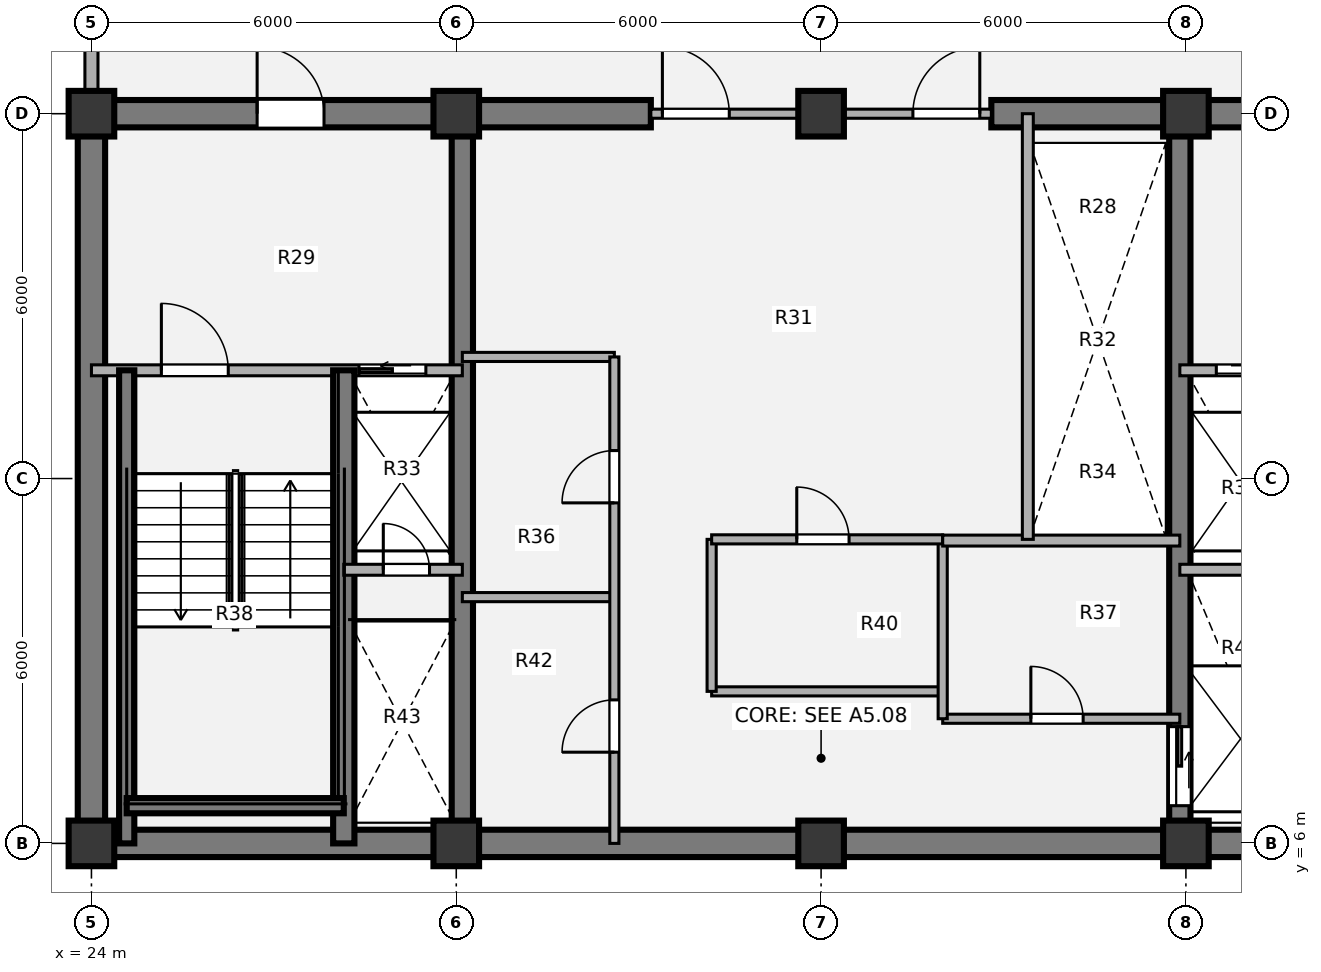
"""IFC4 building model, lengths in metres.
Left out: names, types, materials, properties, quantities, classifications, styles, units other than length and angle.
Written with IfcOpenShell. Run it as: python <this file> out.ifc"""

import sys

from ifc_helpers import new_model, si_unit, direction, frame, frame_2d, origin, origin_2d, place, context, subcontext, project, spatial, rectangle, extrude, source, transform, mapped, element, fill, save


model = new_model("IFC4")
c1 = context("Model", 3, precision=1e-05, world=origin(), true_north=direction((0.0, 1.0)))
c2 = subcontext(c1, "Body", "Model", "MODEL_VIEW")
j1 = project(units=[si_unit("LENGTHUNIT", "METRE"), si_unit("PLANEANGLEUNIT", "RADIAN")], contexts=[c1])
p1 = place(None, origin())
s1 = spatial("IfcSite", under=j1, at=p1, CompositionType="ELEMENT")
p2 = place(p1, origin())
s2 = spatial("IfcBuilding", under=s1, at=p2, CompositionType="ELEMENT")
p3 = place(p2, frame((0.0, 0.0, 209.34)))
s3 = spatial("IfcBuildingStorey", under=s2, at=p3, CompositionType="ELEMENT", Elevation=209.34)
m1 = source(origin(), c2, "Body", "SweptSolid", [
    extrude(rectangle(XDim=0.75, YDim=0.75, at=origin_2d()), origin(), (0.0, 0.0, 1.0), 3.78),
])
for number, where, z_axis, x_axis in (
    (1, (24.0, 6.0, 0.0), (0.0, 0.0, 1.0), (1.0, 0.0, 0.0)),
    (2, (30.0, 6.0, 0.0), (0.0, 0.0, 1.0), (1.0, 0.0, 0.0)),
    (3, (36.0, 6.0, 0.0), (0.0, 0.0, 1.0), (1.0, 0.0, 0.0)),
    (4, (42.0, 6.0, 0.0), (0.0, 0.0, 1.0), (1.0, 0.0, 0.0)),
    (5, (24.0, 18.0, 0.0), (0.0, 0.0, 1.0), (1.0, 0.0, 0.0)),
    (6, (30.0, 18.0, 0.0), (0.0, 0.0, 1.0), (1.0, 0.0, 0.0)),
    (7, (36.0, 18.0, 0.0), (0.0, 0.0, 1.0), (1.0, 0.0, 0.0)),
    (8, (42.0, 18.0, 0.0), (0.0, 0.0, 1.0), (1.0, 0.0, 0.0)),
):
    element("IfcColumn", number, at=place(p3, frame(where, z_axis=z_axis, x_axis=x_axis)), inside=s3, PredefinedType="COLUMN", context=c2, shape_type="MappedRepresentation", body=[
        mapped(m1, transform((0.0, 0.0, 0.0), x_axis=(1.0, 0.0, 0.0), y_axis=(0.0, 1.0, 0.0), z_axis=(0.0, 0.0, 1.0), scale=1.0)),
    ])
p4 = place(p3, frame((48.225, 6.0, 0.0), z_axis=(0.0, 0.0, 1.0), x_axis=(-1.0, 0.0, 0.0)))
e9 = element("IfcWall", 9, at=p4, inside=s3, PredefinedType="SHEAR", context=c2, shape_type="SweptSolid", body=[
    extrude(rectangle(XDim=24.45, YDim=0.45, at=frame_2d((12.225, 0.0))), origin(), (0.0, 0.0, 1.0), 3.78),
])
p5 = place(p3, frame((24.0, 6.0, 0.0), z_axis=(0.0, 0.0, 1.0), x_axis=(0.0, 1.0, 0.0)))
e10 = element("IfcWall", 10, at=p5, inside=s3, PredefinedType="SHEAR", context=c2, shape_type="SweptSolid", body=[
    extrude(rectangle(XDim=12.0, YDim=0.45, at=frame_2d((6.0, 0.0))), origin(), (0.0, 0.0, 1.0), 3.78),
])
p6 = place(p3, frame((23.775, 18.0, 0.0), z_axis=(0.0, 0.0, 1.0), x_axis=(1.0, 0.0, 0.0)))
e11 = element("IfcWall", 11, at=p6, inside=s3, PredefinedType="SHEAR", context=c2, shape_type="SweptSolid", body=[
    extrude(rectangle(XDim=9.425, YDim=0.45, at=frame_2d((4.712, 0.0))), origin(), (0.0, 0.0, 1.0), 3.78),
])
p7 = place(p6, frame((2.95, 0.0, 0.0)))
e12 = element("IfcOpeningElement", 12, at=p7, cuts=e11, PredefinedType="OPENING", context=c2, shape_type="SweptSolid", body=[
    extrude(rectangle(XDim=1.1, YDim=2.1, at=origin_2d()), frame((0.55, 0.235, 1.05), z_axis=(0.0, -1.0, 0.0), x_axis=(1.0, 0.0, 0.0)), (0.0, 0.0, 1.0), 0.47),
])
p8 = place(p3, frame((38.8, 18.0, 0.0), z_axis=(0.0, 0.0, 1.0), x_axis=(1.0, 0.0, 0.0)))
e13 = element("IfcWall", 13, at=p8, inside=s3, PredefinedType="SHEAR", context=c2, shape_type="SweptSolid", body=[
    extrude(rectangle(XDim=9.425, YDim=0.45, at=frame_2d((4.712, 0.0))), origin(), (0.0, 0.0, 1.0), 3.78),
])
p9 = place(p8, frame((5.45, 0.0, 0.0)))
e14 = element("IfcOpeningElement", 14, at=p9, cuts=e13, PredefinedType="OPENING", context=c2, shape_type="SweptSolid", body=[
    extrude(rectangle(XDim=1.1, YDim=2.1, at=origin_2d()), frame((0.55, 0.235, 1.05), z_axis=(0.0, -1.0, 0.0), x_axis=(1.0, 0.0, 0.0)), (0.0, 0.0, 1.0), 0.47),
])
p10 = place(p3, frame((30.1, 6.0, 0.0), z_axis=(0.0, 0.0, 1.0), x_axis=(0.0, 1.0, 0.0)))
e15 = element("IfcWall", 15, at=p10, inside=s3, PredefinedType="SHEAR", context=c2, shape_type="SweptSolid", body=[
    extrude(rectangle(XDim=12.0, YDim=0.35, at=frame_2d((6.0, 0.0))), origin(), (0.0, 0.0, 1.0), 3.78),
])
p11 = place(p3, frame((41.9, 18.0, 0.0), z_axis=(0.0, 0.0, 1.0), x_axis=(0.0, -1.0, 0.0)))
e16 = element("IfcWall", 16, at=p11, inside=s3, PredefinedType="SHEAR", context=c2, shape_type="SweptSolid", body=[
    extrude(rectangle(XDim=12.0, YDim=0.35, at=frame_2d((6.0, 0.0))), origin(), (0.0, 0.0, 1.0), 3.78),
])
p12 = place(p11, frame((10.08, 0.0, 0.0)))
e17 = element("IfcOpeningElement", 17, at=p12, cuts=e16, PredefinedType="OPENING", context=c2, shape_type="SweptSolid", body=[
    extrude(rectangle(XDim=1.3, YDim=2.1, at=origin_2d()), frame((0.65, 0.185, 1.05), z_axis=(0.0, -1.0, 0.0), x_axis=(1.0, 0.0, 0.0)), (0.0, 0.0, 1.0), 0.37),
])
p13 = place(p3, frame((24.0, 18.355, 0.0), z_axis=(0.0, 0.0, 1.0), x_axis=(0.0, 1.0, 0.0)))
e18 = element("IfcWall", 18, at=p13, inside=s3, PredefinedType="SOLIDWALL", context=c2, shape_type="SweptSolid", body=[
    extrude(rectangle(XDim=2.695, YDim=0.215, at=frame_2d((1.348, 0.0))), origin(), (0.0, 0.0, 1.0), 1.86),
])
p14 = place(p3, frame((30.1, 14.0, 0.0), z_axis=(0.0, 0.0, 1.0), x_axis=(1.0, 0.0, 0.0)))
e19 = element("IfcWall", 19, at=p14, inside=s3, PredefinedType="PARTITIONING", context=c2, shape_type="SweptSolid", body=[
    extrude(rectangle(XDim=2.5, YDim=0.15, at=frame_2d((1.25, 0.0))), origin(), (0.0, 0.0, 1.0), 3.342),
])
p15 = place(p3, frame((34.2, 8.5, 0.0), z_axis=(0.0, 0.0, 1.0), x_axis=(1.0, 0.0, 0.0)))
e20 = element("IfcWall", 20, at=p15, inside=s3, PredefinedType="PARTITIONING", context=c2, shape_type="SweptSolid", body=[
    extrude(rectangle(XDim=3.8, YDim=0.15, at=frame_2d((1.9, 0.0))), origin(), (0.0, 0.0, 1.0), 3.342),
])
p16 = place(p3, frame((38.0, 8.05, 0.0), z_axis=(0.0, 0.0, 1.0), x_axis=(1.0, 0.0, 0.0)))
e21 = element("IfcWall", 21, at=p16, inside=s3, PredefinedType="PARTITIONING", context=c2, shape_type="SweptSolid", body=[
    extrude(rectangle(XDim=3.9, YDim=0.15, at=frame_2d((1.95, 0.0))), origin(), (0.0, 0.0, 1.0), 3.342),
])
p17 = place(p16, frame((1.45, 0.0, 0.0)))
e22 = element("IfcOpeningElement", 22, at=p17, cuts=e21, PredefinedType="OPENING", context=c2, shape_type="SweptSolid", body=[
    extrude(rectangle(XDim=0.86, YDim=2.1, at=origin_2d()), frame((0.43, 0.085, 1.05), z_axis=(0.0, -1.0, 0.0), x_axis=(1.0, 0.0, 0.0)), (0.0, 0.0, 1.0), 0.17),
])
p18 = place(p3, frame((34.2, 8.5, 0.0), z_axis=(0.0, 0.0, 1.0), x_axis=(0.0, 1.0, 0.0)))
e23 = element("IfcWall", 23, at=p18, inside=s3, PredefinedType="PARTITIONING", context=c2, shape_type="SweptSolid", body=[
    extrude(rectangle(XDim=2.5, YDim=0.15, at=frame_2d((1.25, 0.0))), origin(), (0.0, 0.0, 1.0), 3.342),
])
p19 = place(p3, frame((38.0, 8.05, 0.0), z_axis=(0.0, 0.0, 1.0), x_axis=(0.0, 1.0, 0.0)))
e24 = element("IfcWall", 24, at=p19, inside=s3, PredefinedType="PARTITIONING", context=c2, shape_type="SweptSolid", body=[
    extrude(rectangle(XDim=2.95, YDim=0.15, at=frame_2d((1.475, 0.0))), origin(), (0.0, 0.0, 1.0), 3.342),
])
p20 = place(p3, frame((34.2, 11.0, 0.0), z_axis=(0.0, 0.0, 1.0), x_axis=(1.0, 0.0, 0.0)))
e25 = element("IfcWall", 25, at=p20, inside=s3, PredefinedType="PARTITIONING", context=c2, shape_type="SweptSolid", body=[
    extrude(rectangle(XDim=3.8, YDim=0.15, at=frame_2d((1.9, 0.0))), origin(), (0.0, 0.0, 1.0), 3.342),
])
p21 = place(p20, frame((1.4, 0.0, 0.0)))
e26 = element("IfcOpeningElement", 26, at=p21, cuts=e25, PredefinedType="OPENING", context=c2, shape_type="SweptSolid", body=[
    extrude(rectangle(XDim=0.86, YDim=2.1, at=origin_2d()), frame((0.43, 0.085, 1.05), z_axis=(0.0, -1.0, 0.0), x_axis=(1.0, 0.0, 0.0)), (0.0, 0.0, 1.0), 0.17),
])
p22 = place(p3, frame((38.0, 10.98, 0.0), z_axis=(0.0, 0.0, 1.0), x_axis=(1.0, 0.0, 0.0)))
e27 = element("IfcWall", 27, at=p22, inside=s3, PredefinedType="PARTITIONING", context=c2, shape_type="SweptSolid", body=[
    extrude(rectangle(XDim=3.9, YDim=0.18, at=frame_2d((1.95, 0.0))), origin(), (0.0, 0.0, 1.0), 3.342),
])
p23 = place(p3, frame((39.4, 11.0, 0.0), z_axis=(0.0, 0.0, 1.0), x_axis=(0.0, 1.0, 0.0)))
e28 = element("IfcWall", 28, at=p23, inside=s3, PredefinedType="PARTITIONING", context=c2, shape_type="SweptSolid", body=[
    extrude(rectangle(XDim=7.0, YDim=0.18, at=frame_2d((3.5, 0.0))), origin(), (0.0, 0.0, 1.0), 3.342),
])
p24 = place(p3, frame((30.1, 10.05, 0.0), z_axis=(0.0, 0.0, 1.0), x_axis=(1.0, 0.0, 0.0)))
e29 = element("IfcWall", 29, at=p24, inside=s3, PredefinedType="PARTITIONING", context=c2, shape_type="SweptSolid", body=[
    extrude(rectangle(XDim=2.5, YDim=0.15, at=frame_2d((1.25, 0.0))), origin(), (0.0, 0.0, 1.0), 3.342),
])
p25 = place(p3, frame((32.6, 6.0, 0.0), z_axis=(0.0, 0.0, 1.0), x_axis=(0.0, 1.0, 0.0)))
e30 = element("IfcWall", 30, at=p25, inside=s3, PredefinedType="PARTITIONING", context=c2, shape_type="SweptSolid", body=[
    extrude(rectangle(XDim=8.0, YDim=0.15, at=frame_2d((4.0, 0.0))), origin(), (0.0, 0.0, 1.0), 3.342),
])
p26 = place(p25, frame((1.5, 0.0, 0.0)))
e31 = element("IfcOpeningElement", 31, at=p26, cuts=e30, PredefinedType="OPENING", context=c2, shape_type="SweptSolid", body=[
    extrude(rectangle(XDim=0.86, YDim=2.1, at=origin_2d()), frame((0.43, 0.085, 1.05), z_axis=(0.0, -1.0, 0.0), x_axis=(1.0, 0.0, 0.0)), (0.0, 0.0, 1.0), 0.17),
])
p27 = place(p25, frame((5.6, 0.0, 0.0)))
e32 = element("IfcOpeningElement", 32, at=p27, cuts=e30, PredefinedType="OPENING", context=c2, shape_type="SweptSolid", body=[
    extrude(rectangle(XDim=0.86, YDim=2.1, at=origin_2d()), frame((0.43, 0.085, 1.05), z_axis=(0.0, -1.0, 0.0), x_axis=(1.0, 0.0, 0.0)), (0.0, 0.0, 1.0), 0.17),
])
p28 = place(p3, frame((33.2, 18.0, 0.0), z_axis=(0.0, 0.0, 1.0), x_axis=(1.0, 0.0, 0.0)))
e33 = element("IfcWall", 33, at=p28, inside=s3, PredefinedType="PARTITIONING", context=c2, shape_type="SweptSolid", body=[
    extrude(rectangle(XDim=5.6, YDim=0.15, at=frame_2d((2.8, 0.0))), origin(), (0.0, 0.0, 1.0), 2.357),
])
p29 = place(p28, frame((0.19, 0.0, 0.0)))
e34 = element("IfcOpeningElement", 34, at=p29, cuts=e33, PredefinedType="OPENING", context=c2, shape_type="SweptSolid", body=[
    extrude(rectangle(XDim=1.1, YDim=2.1, at=origin_2d()), frame((0.55, 0.085, 1.05), z_axis=(0.0, -1.0, 0.0), x_axis=(1.0, 0.0, 0.0)), (0.0, 0.0, 1.0), 0.17),
])
p30 = place(p28, frame((4.31, 0.0, 0.0)))
e35 = element("IfcOpeningElement", 35, at=p30, cuts=e33, PredefinedType="OPENING", context=c2, shape_type="SweptSolid", body=[
    extrude(rectangle(XDim=1.1, YDim=2.1, at=origin_2d()), frame((0.55, 0.085, 1.05), z_axis=(0.0, -1.0, 0.0), x_axis=(1.0, 0.0, 0.0)), (0.0, 0.0, 1.0), 0.17),
])
p31 = place(p3, frame((24.0, 13.78, 0.0), z_axis=(0.0, 0.0, 1.0), x_axis=(1.0, 0.0, 0.0)))
e36 = element("IfcWall", 36, at=p31, inside=s3, PredefinedType="PARTITIONING", context=c2, shape_type="SweptSolid", body=[
    extrude(rectangle(XDim=6.1, YDim=0.18, at=frame_2d((3.05, 0.0))), origin(), (0.0, 0.0, 1.0), 3.342),
])
p32 = place(p31, frame((1.15, 0.0, 0.0)))
e37 = element("IfcOpeningElement", 37, at=p32, cuts=e36, PredefinedType="OPENING", context=c2, shape_type="SweptSolid", body=[
    extrude(rectangle(XDim=1.1, YDim=2.1, at=origin_2d()), frame((0.55, 0.1, 1.05), z_axis=(0.0, -1.0, 0.0), x_axis=(1.0, 0.0, 0.0)), (0.0, 0.0, 1.0), 0.2),
])
p33 = place(p31, frame((4.4, 0.0, 0.0)))
e38 = element("IfcOpeningElement", 38, at=p33, cuts=e36, PredefinedType="OPENING", context=c2, shape_type="SweptSolid", body=[
    extrude(rectangle(XDim=1.1, YDim=2.1, at=origin_2d()), frame((0.55, 0.1, 1.05), z_axis=(0.0, -1.0, 0.0), x_axis=(1.0, 0.0, 0.0)), (0.0, 0.0, 1.0), 0.2),
])
p34 = place(p3, frame((28.15, 6.0, 0.0), z_axis=(0.0, 0.0, 1.0), x_axis=(0.0, 1.0, 0.0)))
e39 = element("IfcWall", 39, at=p34, inside=s3, PredefinedType="SHEAR", context=c2, shape_type="SweptSolid", body=[
    extrude(rectangle(XDim=7.78, YDim=0.35, at=frame_2d((3.89, 0.0))), origin(), (0.0, 0.0, 1.0), 3.692),
])
p35 = place(p3, frame((24.58, 6.0, 0.0), z_axis=(0.0, 0.0, 1.0), x_axis=(0.0, 1.0, 0.0)))
e40 = element("IfcWall", 40, at=p35, inside=s3, PredefinedType="SHEAR", context=c2, shape_type="SweptSolid", body=[
    extrude(rectangle(XDim=7.78, YDim=0.25, at=frame_2d((3.89, 0.0))), origin(), (0.0, 0.0, 1.0), 3.692),
])
p36 = place(p3, frame((24.58, 6.62, 0.0), z_axis=(0.0, 0.0, 1.0), x_axis=(1.0, 0.0, 0.0)))
e41 = element("IfcWall", 41, at=p36, inside=s3, PredefinedType="SHEAR", context=c2, shape_type="SweptSolid", body=[
    extrude(rectangle(XDim=3.57, YDim=0.25, at=frame_2d((1.785, 0.0))), origin(), (0.0, 0.0, 1.0), 3.692),
])
p37 = place(p3, frame((28.15, 10.5, 0.0), z_axis=(0.0, 0.0, 1.0), x_axis=(1.0, 0.0, 0.0)))
e42 = element("IfcWall", 42, at=p37, inside=s3, PredefinedType="PARTITIONING", context=c2, shape_type="SweptSolid", body=[
    extrude(rectangle(XDim=1.95, YDim=0.18, at=frame_2d((0.975, 0.0))), origin(), (0.0, 0.0, 1.0), 3.342),
])
p38 = place(p37, frame((0.65, 0.0, 0.0)))
e43 = element("IfcOpeningElement", 43, at=p38, cuts=e42, PredefinedType="OPENING", context=c2, shape_type="SweptSolid", body=[
    extrude(rectangle(XDim=0.76, YDim=2.05, at=origin_2d()), frame((0.38, 0.1, 1.025), z_axis=(0.0, -1.0, 0.0), x_axis=(1.0, 0.0, 0.0)), (0.0, 0.0, 1.0), 0.2),
])
p39 = place(p3, frame((41.9, 13.78, 0.0), z_axis=(0.0, 0.0, 1.0), x_axis=(1.0, 0.0, 0.0)))
e44 = element("IfcWall", 44, at=p39, inside=s3, PredefinedType="PARTITIONING", context=c2, shape_type="SweptSolid", body=[
    extrude(rectangle(XDim=6.1, YDim=0.18, at=frame_2d((3.05, 0.0))), origin(), (0.0, 0.0, 1.0), 3.342),
])
p40 = place(p39, frame((0.6, 0.0, 0.0)))
e45 = element("IfcOpeningElement", 45, at=p40, cuts=e44, PredefinedType="OPENING", context=c2, shape_type="SweptSolid", body=[
    extrude(rectangle(XDim=1.1, YDim=2.1, at=origin_2d()), frame((0.55, 0.1, 1.05), z_axis=(0.0, -1.0, 0.0), x_axis=(1.0, 0.0, 0.0)), (0.0, 0.0, 1.0), 0.2),
])
p41 = place(p39, frame((3.8, 0.0, 0.0)))
e46 = element("IfcOpeningElement", 46, at=p41, cuts=e44, PredefinedType="OPENING", context=c2, shape_type="SweptSolid", body=[
    extrude(rectangle(XDim=1.1, YDim=2.1, at=origin_2d()), frame((0.55, 0.1, 1.05), z_axis=(0.0, -1.0, 0.0), x_axis=(1.0, 0.0, 0.0)), (0.0, 0.0, 1.0), 0.2),
])
p42 = place(p3, frame((41.9, 10.5, 0.0), z_axis=(0.0, 0.0, 1.0), x_axis=(1.0, 0.0, 0.0)))
e47 = element("IfcWall", 47, at=p42, inside=s3, PredefinedType="PARTITIONING", context=c2, shape_type="SweptSolid", body=[
    extrude(rectangle(XDim=1.95, YDim=0.18, at=frame_2d((0.975, 0.0))), origin(), (0.0, 0.0, 1.0), 3.342),
])
m2 = source(origin(), c2, "Body", "SweptSolid", [
    extrude(rectangle(XDim=0.86, YDim=2.1, at=origin_2d()), frame((0.43, 0.025, 1.05), z_axis=(0.0, -1.0, 0.0), x_axis=(1.0, 0.0, 0.0)), (0.0, 0.0, 1.0), 0.05),
])
p43 = place(p17, origin())
e48 = element("IfcDoor", 48, at=p43, inside=s3, OperationType="SINGLE_SWING_LEFT", PredefinedType="DOOR", context=c2, shape_type="MappedRepresentation", body=[
    mapped(m2, transform((0.0, 0.0, 0.0), x_axis=(1.0, 0.0, 0.0), y_axis=(0.0, 1.0, 0.0), z_axis=(0.0, 0.0, 1.0), scale=1.0)),
])
fill(e22, e48)
p44 = place(p21, origin())
e49 = element("IfcDoor", 49, at=p44, inside=s3, OperationType="SINGLE_SWING_LEFT", PredefinedType="DOOR", context=c2, shape_type="MappedRepresentation", body=[
    mapped(m2, transform((0.0, 0.0, 0.0), x_axis=(1.0, 0.0, 0.0), y_axis=(0.0, 1.0, 0.0), z_axis=(0.0, 0.0, 1.0), scale=1.0)),
])
fill(e26, e49)
p45 = place(p26, origin())
e50 = element("IfcDoor", 50, at=p45, inside=s3, OperationType="SINGLE_SWING_LEFT", PredefinedType="DOOR", context=c2, shape_type="MappedRepresentation", body=[
    mapped(m2, transform((0.0, 0.0, 0.0), x_axis=(1.0, 0.0, 0.0), y_axis=(0.0, 1.0, 0.0), z_axis=(0.0, 0.0, 1.0), scale=1.0)),
])
fill(e31, e50)
p46 = place(p27, origin())
e51 = element("IfcDoor", 51, at=p46, inside=s3, OperationType="SINGLE_SWING_LEFT", PredefinedType="DOOR", context=c2, shape_type="MappedRepresentation", body=[
    mapped(m2, transform((0.0, 0.0, 0.0), x_axis=(1.0, 0.0, 0.0), y_axis=(0.0, 1.0, 0.0), z_axis=(0.0, 0.0, 1.0), scale=1.0)),
])
fill(e32, e51)
m3 = source(origin(), c2, "Body", "SweptSolid", [
    extrude(rectangle(XDim=1.1, YDim=2.1, at=origin_2d()), frame((0.55, 0.025, 1.05), z_axis=(0.0, -1.0, 0.0), x_axis=(1.0, 0.0, 0.0)), (0.0, 0.0, 1.0), 0.05),
])
p47 = place(p29, origin())
e52 = element("IfcDoor", 52, at=p47, inside=s3, OperationType="SINGLE_SWING_LEFT", PredefinedType="DOOR", context=c2, shape_type="MappedRepresentation", body=[
    mapped(m3, transform((0.0, 0.0, 0.0), x_axis=(1.0, 0.0, 0.0), y_axis=(0.0, 1.0, 0.0), z_axis=(0.0, 0.0, 1.0), scale=1.0)),
])
fill(e34, e52)
p48 = place(p30, origin())
e53 = element("IfcDoor", 53, at=p48, inside=s3, OperationType="SINGLE_SWING_RIGHT", PredefinedType="DOOR", context=c2, shape_type="MappedRepresentation", body=[
    mapped(m3, transform((0.0, 0.0, 0.0), x_axis=(1.0, 0.0, 0.0), y_axis=(0.0, 1.0, 0.0), z_axis=(0.0, 0.0, 1.0), scale=1.0)),
])
fill(e35, e53)
m4 = source(origin(), c2, "Body", "SweptSolid", [
    extrude(rectangle(XDim=1.1, YDim=2.1, at=origin_2d()), frame((0.55, 0.025, 1.05), z_axis=(0.0, -1.0, 0.0), x_axis=(1.0, 0.0, 0.0)), (0.0, 0.0, 1.0), 0.05),
])
p49 = place(p32, origin())
e54 = element("IfcDoor", 54, at=p49, inside=s3, OperationType="SINGLE_SWING_LEFT", PredefinedType="DOOR", context=c2, shape_type="MappedRepresentation", body=[
    mapped(m4, transform((0.0, 0.0, 0.0), x_axis=(1.0, 0.0, 0.0), y_axis=(0.0, 1.0, 0.0), z_axis=(0.0, 0.0, 1.0), scale=1.0)),
])
fill(e37, e54)
m5 = source(origin(), c2, "Body", "SweptSolid", [
    extrude(rectangle(XDim=1.1, YDim=2.1, at=origin_2d()), frame((0.55, 0.025, 1.05), z_axis=(0.0, -1.0, 0.0), x_axis=(1.0, 0.0, 0.0)), (0.0, 0.0, 1.0), 0.05),
])
p50 = place(p33, origin())
e55 = element("IfcDoor", 55, at=p50, inside=s3, OperationType="SLIDING_TO_LEFT", PredefinedType="DOOR", context=c2, shape_type="MappedRepresentation", body=[
    mapped(m5, transform((0.0, 0.0, 0.0), x_axis=(1.0, 0.0, 0.0), y_axis=(0.0, 1.0, 0.0), z_axis=(0.0, 0.0, 1.0), scale=1.0)),
])
fill(e38, e55)
m6 = source(origin(), c2, "Body", "SweptSolid", [
    extrude(rectangle(XDim=0.76, YDim=2.05, at=origin_2d()), frame((0.38, 0.025, 1.025), z_axis=(0.0, -1.0, 0.0), x_axis=(1.0, 0.0, 0.0)), (0.0, 0.0, 1.0), 0.05),
])
p51 = place(p38, origin())
e56 = element("IfcDoor", 56, at=p51, inside=s3, OperationType="SINGLE_SWING_LEFT", PredefinedType="DOOR", context=c2, shape_type="MappedRepresentation", body=[
    mapped(m6, transform((0.0, 0.0, 0.0), x_axis=(1.0, 0.0, 0.0), y_axis=(0.0, 1.0, 0.0), z_axis=(0.0, 0.0, 1.0), scale=1.0)),
])
fill(e43, e56)
p52 = place(p40, origin())
e57 = element("IfcDoor", 57, at=p52, inside=s3, OperationType="SLIDING_TO_RIGHT", PredefinedType="DOOR", context=c2, shape_type="MappedRepresentation", body=[
    mapped(m5, transform((0.0, 0.0, 0.0), x_axis=(1.0, 0.0, 0.0), y_axis=(0.0, 1.0, 0.0), z_axis=(0.0, 0.0, 1.0), scale=1.0)),
])
fill(e45, e57)
m7 = source(origin(), c2, "Body", "SweptSolid", [
    extrude(rectangle(XDim=1.3, YDim=2.1, at=origin_2d()), frame((0.65, 0.025, 1.05), z_axis=(0.0, -1.0, 0.0), x_axis=(1.0, 0.0, 0.0)), (0.0, 0.0, 1.0), 0.05),
])
p53 = place(p12, origin())
e58 = element("IfcDoor", 58, at=p53, inside=s3, OperationType="SLIDING_TO_LEFT", PredefinedType="DOOR", context=c2, shape_type="MappedRepresentation", body=[
    mapped(m7, transform((0.0, 0.0, 0.0), x_axis=(1.0, 0.0, 0.0), y_axis=(0.0, 1.0, 0.0), z_axis=(0.0, 0.0, 1.0), scale=1.0)),
])
fill(e17, e58)
p54 = place(p7, origin())
e59 = element("IfcDoor", 59, at=p54, inside=s3, OperationType="SINGLE_SWING_LEFT", PredefinedType="DOOR", context=c2, shape_type="MappedRepresentation", body=[
    mapped(m3, transform((0.0, 0.0, 0.0), x_axis=(1.0, 0.0, 0.0), y_axis=(0.0, 1.0, 0.0), z_axis=(0.0, 0.0, 1.0), scale=1.0)),
])
fill(e12, e59)
save(model, sys.argv[1])
